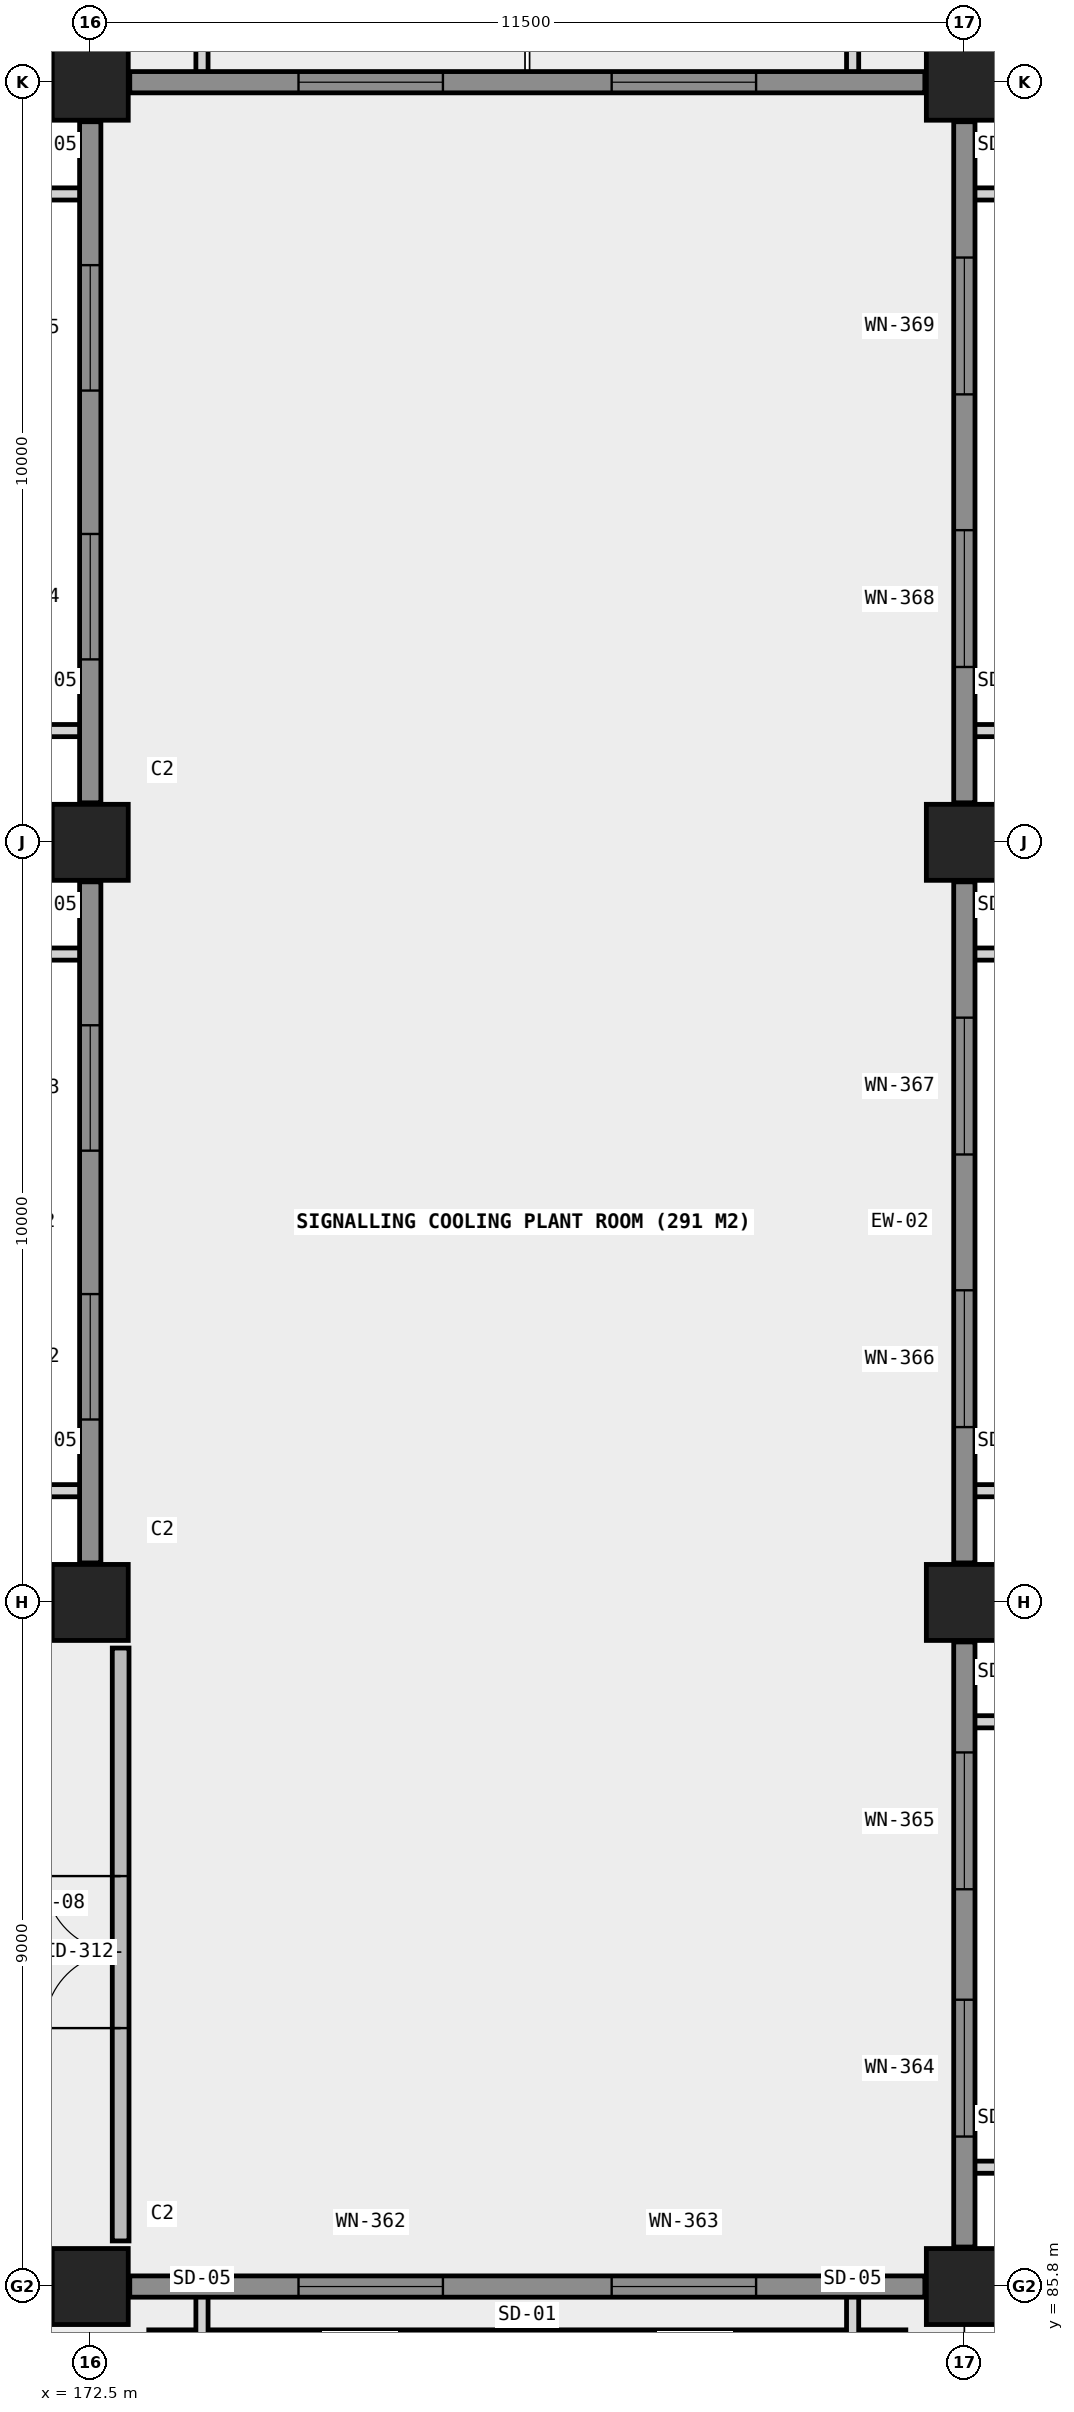
"""IFC4 building model, lengths in metres.
Left out: names, types, materials, properties, quantities, classifications, styles, units other than length and angle.
Written with IfcOpenShell. Run it as: python <this file> out.ifc"""

import sys

from ifc_helpers import new_model, si_unit, direction, frame, frame_2d, origin, origin_2d, place, context, subcontext, project, spatial, rectangle, extrude, element, fill, save


model = new_model("IFC4")
c1 = context("Model", 3, precision=1e-05, world=origin(), true_north=direction((0.0, 1.0)))
c2 = subcontext(c1, "Body", "Model", "MODEL_VIEW")
j1 = project(units=[si_unit("LENGTHUNIT", "METRE"), si_unit("PLANEANGLEUNIT", "RADIAN")], contexts=[c1])
p1 = place(None, origin())
s1 = spatial("IfcSite", under=j1, at=p1, CompositionType="ELEMENT")
p2 = place(p1, origin())
s2 = spatial("IfcBuilding", under=s1, at=p2, CompositionType="ELEMENT")
p3 = place(p2, frame((0.0, 0.0, 4.2)))
s3 = spatial("IfcBuildingStorey", under=s2, at=p3, CompositionType="ELEMENT", Elevation=4.2)
for number, where, z_axis, x_axis in (
    (1, (172.5, 85.8, 0.0), (0.0, 0.0, 1.0), (1.0, 0.0, 0.0)),
    (2, (172.5, 94.8, 0.0), (0.0, 0.0, 1.0), (1.0, 0.0, 0.0)),
    (3, (172.5, 104.8, 0.0), (0.0, 0.0, 1.0), (1.0, 0.0, 0.0)),
    (4, (172.5, 114.8, 0.0), (0.0, 0.0, 1.0), (1.0, 0.0, 0.0)),
    (5, (184.0, 85.8, 0.0), (0.0, 0.0, 1.0), (1.0, 0.0, 0.0)),
    (6, (184.0, 94.8, 0.0), (0.0, 0.0, 1.0), (1.0, 0.0, 0.0)),
    (7, (184.0, 104.8, 0.0), (0.0, 0.0, 1.0), (1.0, 0.0, 0.0)),
    (8, (184.0, 114.8, 0.0), (0.0, 0.0, 1.0), (1.0, 0.0, 0.0)),
):
    element("IfcColumn", number, at=place(p3, frame(where, z_axis=z_axis, x_axis=x_axis)), inside=s3, PredefinedType="COLUMN", context=c2, shape_type="SweptSolid", body=[
        extrude(rectangle(XDim=1.0, YDim=1.0, at=origin_2d()), origin(), (0.0, 0.0, 1.0), 4.2),
    ])
p4 = place(p3, frame((173.02, 85.8, 0.0), z_axis=(0.0, 0.0, 1.0), x_axis=(1.0, 0.0, 0.0)))
e9 = element("IfcWall", 9, at=p4, inside=s3, PredefinedType="SOLIDWALL", context=c2, shape_type="SweptSolid", body=[
    extrude(rectangle(XDim=10.46, YDim=0.28, at=frame_2d((5.23, 0.0))), origin(), (0.0, 0.0, 1.0), 3.15),
])
p5 = place(p4, frame((2.22, 0.0, 1.25)))
e10 = element("IfcOpeningElement", 10, at=p5, cuts=e9, PredefinedType="OPENING", context=c2, shape_type="SweptSolid", body=[
    extrude(rectangle(XDim=1.9, YDim=1.25, at=frame_2d((0.95, 0.625))), frame((0.0, 0.15, 0.0), z_axis=(0.0, -1.0, 0.0), x_axis=(1.0, 0.0, 0.0)), (0.0, 0.0, 1.0), 0.3),
])
p6 = place(p4, frame((6.34, 0.0, 1.25)))
e11 = element("IfcOpeningElement", 11, at=p6, cuts=e9, PredefinedType="OPENING", context=c2, shape_type="SweptSolid", body=[
    extrude(rectangle(XDim=1.9, YDim=1.25, at=frame_2d((0.95, 0.625))), frame((0.0, 0.15, 0.0), z_axis=(0.0, -1.0, 0.0), x_axis=(1.0, 0.0, 0.0)), (0.0, 0.0, 1.0), 0.3),
])
p7 = place(p3, frame((184.0, 86.32, 0.0), z_axis=(0.0, 0.0, 1.0), x_axis=(0.0, 1.0, 0.0)))
e12 = element("IfcWall", 12, at=p7, inside=s3, PredefinedType="SOLIDWALL", context=c2, shape_type="SweptSolid", body=[
    extrude(rectangle(XDim=7.96, YDim=0.28, at=frame_2d((3.98, 0.0))), origin(), (0.0, 0.0, 1.0), 3.25),
])
p8 = place(p7, frame((1.453, 0.0, 1.25)))
e13 = element("IfcOpeningElement", 13, at=p8, cuts=e12, PredefinedType="OPENING", context=c2, shape_type="SweptSolid", body=[
    extrude(rectangle(XDim=1.8, YDim=1.3, at=frame_2d((0.9, 0.65))), frame((0.0, 0.15, 0.0), z_axis=(0.0, -1.0, 0.0), x_axis=(1.0, 0.0, 0.0)), (0.0, 0.0, 1.0), 0.3),
])
p9 = place(p7, frame((4.707, 0.0, 1.25)))
e14 = element("IfcOpeningElement", 14, at=p9, cuts=e12, PredefinedType="OPENING", context=c2, shape_type="SweptSolid", body=[
    extrude(rectangle(XDim=1.8, YDim=1.3, at=frame_2d((0.9, 0.65))), frame((0.0, 0.15, 0.0), z_axis=(0.0, -1.0, 0.0), x_axis=(1.0, 0.0, 0.0)), (0.0, 0.0, 1.0), 0.3),
])
p10 = place(p3, frame((184.0, 95.32, 0.0), z_axis=(0.0, 0.0, 1.0), x_axis=(0.0, 1.0, 0.0)))
e15 = element("IfcWall", 15, at=p10, inside=s3, PredefinedType="SOLIDWALL", context=c2, shape_type="SweptSolid", body=[
    extrude(rectangle(XDim=8.96, YDim=0.28, at=frame_2d((4.48, 0.0))), origin(), (0.0, 0.0, 1.0), 3.25),
])
p11 = place(p10, frame((1.787, 0.0, 1.25)))
e16 = element("IfcOpeningElement", 16, at=p11, cuts=e15, PredefinedType="OPENING", context=c2, shape_type="SweptSolid", body=[
    extrude(rectangle(XDim=1.8, YDim=1.3, at=frame_2d((0.9, 0.65))), frame((0.0, 0.15, 0.0), z_axis=(0.0, -1.0, 0.0), x_axis=(1.0, 0.0, 0.0)), (0.0, 0.0, 1.0), 0.3),
])
p12 = place(p10, frame((5.373, 0.0, 1.25)))
e17 = element("IfcOpeningElement", 17, at=p12, cuts=e15, PredefinedType="OPENING", context=c2, shape_type="SweptSolid", body=[
    extrude(rectangle(XDim=1.8, YDim=1.3, at=frame_2d((0.9, 0.65))), frame((0.0, 0.15, 0.0), z_axis=(0.0, -1.0, 0.0), x_axis=(1.0, 0.0, 0.0)), (0.0, 0.0, 1.0), 0.3),
])
p13 = place(p3, frame((184.0, 105.32, 0.0), z_axis=(0.0, 0.0, 1.0), x_axis=(0.0, 1.0, 0.0)))
e18 = element("IfcWall", 18, at=p13, inside=s3, PredefinedType="SOLIDWALL", context=c2, shape_type="SweptSolid", body=[
    extrude(rectangle(XDim=8.96, YDim=0.28, at=frame_2d((4.48, 0.0))), origin(), (0.0, 0.0, 1.0), 3.25),
])
p14 = place(p13, frame((1.787, 0.0, 1.25)))
e19 = element("IfcOpeningElement", 19, at=p14, cuts=e18, PredefinedType="OPENING", context=c2, shape_type="SweptSolid", body=[
    extrude(rectangle(XDim=1.8, YDim=1.3, at=frame_2d((0.9, 0.65))), frame((0.0, 0.15, 0.0), z_axis=(0.0, -1.0, 0.0), x_axis=(1.0, 0.0, 0.0)), (0.0, 0.0, 1.0), 0.3),
])
p15 = place(p13, frame((5.373, 0.0, 1.25)))
e20 = element("IfcOpeningElement", 20, at=p15, cuts=e18, PredefinedType="OPENING", context=c2, shape_type="SweptSolid", body=[
    extrude(rectangle(XDim=1.8, YDim=1.3, at=frame_2d((0.9, 0.65))), frame((0.0, 0.15, 0.0), z_axis=(0.0, -1.0, 0.0), x_axis=(1.0, 0.0, 0.0)), (0.0, 0.0, 1.0), 0.3),
])
p16 = place(p3, frame((173.02, 114.8, 0.0), z_axis=(0.0, 0.0, 1.0), x_axis=(1.0, 0.0, 0.0)))
e21 = element("IfcWall", 21, at=p16, inside=s3, PredefinedType="SOLIDWALL", context=c2, shape_type="SweptSolid", body=[
    extrude(rectangle(XDim=10.46, YDim=0.28, at=frame_2d((5.23, 0.0))), origin(), (0.0, 0.0, 1.0), 3.15),
])
p17 = place(p16, frame((2.22, 0.0, 1.25)))
e22 = element("IfcOpeningElement", 22, at=p17, cuts=e21, PredefinedType="OPENING", context=c2, shape_type="SweptSolid", body=[
    extrude(rectangle(XDim=1.9, YDim=1.25, at=frame_2d((0.95, 0.625))), frame((0.0, 0.15, 0.0), z_axis=(0.0, -1.0, 0.0), x_axis=(1.0, 0.0, 0.0)), (0.0, 0.0, 1.0), 0.3),
])
p18 = place(p16, frame((6.34, 0.0, 1.25)))
e23 = element("IfcOpeningElement", 23, at=p18, cuts=e21, PredefinedType="OPENING", context=c2, shape_type="SweptSolid", body=[
    extrude(rectangle(XDim=1.9, YDim=1.25, at=frame_2d((0.95, 0.625))), frame((0.0, 0.15, 0.0), z_axis=(0.0, -1.0, 0.0), x_axis=(1.0, 0.0, 0.0)), (0.0, 0.0, 1.0), 0.3),
])
p19 = place(p3, frame((172.5, 95.32, 0.0), z_axis=(0.0, 0.0, 1.0), x_axis=(0.0, 1.0, 0.0)))
e24 = element("IfcWall", 24, at=p19, inside=s3, PredefinedType="SOLIDWALL", context=c2, shape_type="SweptSolid", body=[
    extrude(rectangle(XDim=8.96, YDim=0.28, at=frame_2d((4.48, 0.0))), origin(), (0.0, 0.0, 1.0), 3.15),
])
p20 = place(p19, frame((1.887, 0.0, 0.85)))
e25 = element("IfcOpeningElement", 25, at=p20, cuts=e24, PredefinedType="OPENING", context=c2, shape_type="SweptSolid", body=[
    extrude(rectangle(XDim=1.65, YDim=1.9, at=frame_2d((0.825, 0.95))), frame((0.0, 0.15, 0.0), z_axis=(0.0, -1.0, 0.0), x_axis=(1.0, 0.0, 0.0)), (0.0, 0.0, 1.0), 0.3),
])
p21 = place(p19, frame((5.423, 0.0, 0.85)))
e26 = element("IfcOpeningElement", 26, at=p21, cuts=e24, PredefinedType="OPENING", context=c2, shape_type="SweptSolid", body=[
    extrude(rectangle(XDim=1.65, YDim=1.9, at=frame_2d((0.825, 0.95))), frame((0.0, 0.15, 0.0), z_axis=(0.0, -1.0, 0.0), x_axis=(1.0, 0.0, 0.0)), (0.0, 0.0, 1.0), 0.3),
])
p22 = place(p3, frame((172.5, 105.32, 0.0), z_axis=(0.0, 0.0, 1.0), x_axis=(0.0, 1.0, 0.0)))
e27 = element("IfcWall", 27, at=p22, inside=s3, PredefinedType="SOLIDWALL", context=c2, shape_type="SweptSolid", body=[
    extrude(rectangle(XDim=8.96, YDim=0.28, at=frame_2d((4.48, 0.0))), origin(), (0.0, 0.0, 1.0), 3.15),
])
p23 = place(p22, frame((1.887, 0.0, 0.85)))
e28 = element("IfcOpeningElement", 28, at=p23, cuts=e27, PredefinedType="OPENING", context=c2, shape_type="SweptSolid", body=[
    extrude(rectangle(XDim=1.65, YDim=1.9, at=frame_2d((0.825, 0.95))), frame((0.0, 0.15, 0.0), z_axis=(0.0, -1.0, 0.0), x_axis=(1.0, 0.0, 0.0)), (0.0, 0.0, 1.0), 0.3),
])
p24 = place(p22, frame((5.423, 0.0, 0.85)))
e29 = element("IfcOpeningElement", 29, at=p24, cuts=e27, PredefinedType="OPENING", context=c2, shape_type="SweptSolid", body=[
    extrude(rectangle(XDim=1.65, YDim=1.9, at=frame_2d((0.825, 0.95))), frame((0.0, 0.15, 0.0), z_axis=(0.0, -1.0, 0.0), x_axis=(1.0, 0.0, 0.0)), (0.0, 0.0, 1.0), 0.3),
])
p25 = place(p3, frame((172.9, 86.4, 0.0), z_axis=(0.0, 0.0, 1.0), x_axis=(0.0, 1.0, 0.0)))
e30 = element("IfcWall", 30, at=p25, inside=s3, PredefinedType="SOLIDWALL", context=c2, shape_type="SweptSolid", body=[
    extrude(rectangle(XDim=7.8, YDim=0.22, at=frame_2d((3.9, 0.0))), origin(), (0.0, 0.0, 1.0), 3.84),
])
p26 = place(p25, frame((2.8, 0.0, 0.0)))
e31 = element("IfcOpeningElement", 31, at=p26, cuts=e30, PredefinedType="OPENING", context=c2, shape_type="SweptSolid", body=[
    extrude(rectangle(XDim=2.0, YDim=2.3, at=frame_2d((1.0, 1.15))), frame((0.0, 0.12, 0.0), z_axis=(0.0, -1.0, 0.0), x_axis=(1.0, 0.0, 0.0)), (0.0, 0.0, 1.0), 0.24),
])
p27 = place(p5, origin())
e32 = element("IfcWindow", 32, at=p27, inside=s3, PartitioningType="SINGLE_PANEL", PredefinedType="WINDOW", context=c2, shape_type="SweptSolid", body=[
    extrude(rectangle(XDim=1.9, YDim=1.25, at=frame_2d((0.95, 0.625))), frame((0.0, 0.03, 0.0), z_axis=(0.0, -1.0, 0.0), x_axis=(1.0, 0.0, 0.0)), (0.0, 0.0, 1.0), 0.06),
])
fill(e10, e32)
p28 = place(p6, origin())
e33 = element("IfcWindow", 33, at=p28, inside=s3, PartitioningType="SINGLE_PANEL", PredefinedType="WINDOW", context=c2, shape_type="SweptSolid", body=[
    extrude(rectangle(XDim=1.9, YDim=1.25, at=frame_2d((0.95, 0.625))), frame((0.0, 0.03, 0.0), z_axis=(0.0, -1.0, 0.0), x_axis=(1.0, 0.0, 0.0)), (0.0, 0.0, 1.0), 0.06),
])
fill(e11, e33)
p29 = place(p8, origin())
e34 = element("IfcWindow", 34, at=p29, inside=s3, PartitioningType="SINGLE_PANEL", PredefinedType="WINDOW", context=c2, shape_type="SweptSolid", body=[
    extrude(rectangle(XDim=1.8, YDim=1.3, at=frame_2d((0.9, 0.65))), frame((0.0, 0.03, 0.0), z_axis=(0.0, -1.0, 0.0), x_axis=(1.0, 0.0, 0.0)), (0.0, 0.0, 1.0), 0.06),
])
fill(e13, e34)
p30 = place(p9, origin())
e35 = element("IfcWindow", 35, at=p30, inside=s3, PartitioningType="SINGLE_PANEL", PredefinedType="WINDOW", context=c2, shape_type="SweptSolid", body=[
    extrude(rectangle(XDim=1.8, YDim=1.3, at=frame_2d((0.9, 0.65))), frame((0.0, 0.03, 0.0), z_axis=(0.0, -1.0, 0.0), x_axis=(1.0, 0.0, 0.0)), (0.0, 0.0, 1.0), 0.06),
])
fill(e14, e35)
p31 = place(p11, origin())
e36 = element("IfcWindow", 36, at=p31, inside=s3, PartitioningType="SINGLE_PANEL", PredefinedType="WINDOW", context=c2, shape_type="SweptSolid", body=[
    extrude(rectangle(XDim=1.8, YDim=1.3, at=frame_2d((0.9, 0.65))), frame((0.0, 0.03, 0.0), z_axis=(0.0, -1.0, 0.0), x_axis=(1.0, 0.0, 0.0)), (0.0, 0.0, 1.0), 0.06),
])
fill(e16, e36)
p32 = place(p12, origin())
e37 = element("IfcWindow", 37, at=p32, inside=s3, PartitioningType="SINGLE_PANEL", PredefinedType="WINDOW", context=c2, shape_type="SweptSolid", body=[
    extrude(rectangle(XDim=1.8, YDim=1.3, at=frame_2d((0.9, 0.65))), frame((0.0, 0.03, 0.0), z_axis=(0.0, -1.0, 0.0), x_axis=(1.0, 0.0, 0.0)), (0.0, 0.0, 1.0), 0.06),
])
fill(e17, e37)
p33 = place(p14, origin())
e38 = element("IfcWindow", 38, at=p33, inside=s3, PartitioningType="SINGLE_PANEL", PredefinedType="WINDOW", context=c2, shape_type="SweptSolid", body=[
    extrude(rectangle(XDim=1.8, YDim=1.3, at=frame_2d((0.9, 0.65))), frame((0.0, 0.03, 0.0), z_axis=(0.0, -1.0, 0.0), x_axis=(1.0, 0.0, 0.0)), (0.0, 0.0, 1.0), 0.06),
])
fill(e19, e38)
p34 = place(p15, origin())
e39 = element("IfcWindow", 39, at=p34, inside=s3, PartitioningType="SINGLE_PANEL", PredefinedType="WINDOW", context=c2, shape_type="SweptSolid", body=[
    extrude(rectangle(XDim=1.8, YDim=1.3, at=frame_2d((0.9, 0.65))), frame((0.0, 0.03, 0.0), z_axis=(0.0, -1.0, 0.0), x_axis=(1.0, 0.0, 0.0)), (0.0, 0.0, 1.0), 0.06),
])
fill(e20, e39)
p35 = place(p17, origin())
e40 = element("IfcWindow", 40, at=p35, inside=s3, PartitioningType="SINGLE_PANEL", PredefinedType="WINDOW", context=c2, shape_type="SweptSolid", body=[
    extrude(rectangle(XDim=1.9, YDim=1.25, at=frame_2d((0.95, 0.625))), frame((0.0, 0.03, 0.0), z_axis=(0.0, -1.0, 0.0), x_axis=(1.0, 0.0, 0.0)), (0.0, 0.0, 1.0), 0.06),
])
fill(e22, e40)
p36 = place(p18, origin())
e41 = element("IfcWindow", 41, at=p36, inside=s3, PartitioningType="SINGLE_PANEL", PredefinedType="WINDOW", context=c2, shape_type="SweptSolid", body=[
    extrude(rectangle(XDim=1.9, YDim=1.25, at=frame_2d((0.95, 0.625))), frame((0.0, 0.03, 0.0), z_axis=(0.0, -1.0, 0.0), x_axis=(1.0, 0.0, 0.0)), (0.0, 0.0, 1.0), 0.06),
])
fill(e23, e41)
p37 = place(p20, origin())
e42 = element("IfcWindow", 42, at=p37, inside=s3, PartitioningType="SINGLE_PANEL", PredefinedType="WINDOW", context=c2, shape_type="SweptSolid", body=[
    extrude(rectangle(XDim=1.65, YDim=1.9, at=frame_2d((0.825, 0.95))), frame((0.0, 0.03, 0.0), z_axis=(0.0, -1.0, 0.0), x_axis=(1.0, 0.0, 0.0)), (0.0, 0.0, 1.0), 0.06),
])
fill(e25, e42)
p38 = place(p21, origin())
e43 = element("IfcWindow", 43, at=p38, inside=s3, PartitioningType="SINGLE_PANEL", PredefinedType="WINDOW", context=c2, shape_type="SweptSolid", body=[
    extrude(rectangle(XDim=1.65, YDim=1.9, at=frame_2d((0.825, 0.95))), frame((0.0, 0.03, 0.0), z_axis=(0.0, -1.0, 0.0), x_axis=(1.0, 0.0, 0.0)), (0.0, 0.0, 1.0), 0.06),
])
fill(e26, e43)
p39 = place(p23, origin())
e44 = element("IfcWindow", 44, at=p39, inside=s3, PartitioningType="SINGLE_PANEL", PredefinedType="WINDOW", context=c2, shape_type="SweptSolid", body=[
    extrude(rectangle(XDim=1.65, YDim=1.9, at=frame_2d((0.825, 0.95))), frame((0.0, 0.03, 0.0), z_axis=(0.0, -1.0, 0.0), x_axis=(1.0, 0.0, 0.0)), (0.0, 0.0, 1.0), 0.06),
])
fill(e28, e44)
p40 = place(p24, origin())
e45 = element("IfcWindow", 45, at=p40, inside=s3, PartitioningType="SINGLE_PANEL", PredefinedType="WINDOW", context=c2, shape_type="SweptSolid", body=[
    extrude(rectangle(XDim=1.65, YDim=1.9, at=frame_2d((0.825, 0.95))), frame((0.0, 0.03, 0.0), z_axis=(0.0, -1.0, 0.0), x_axis=(1.0, 0.0, 0.0)), (0.0, 0.0, 1.0), 0.06),
])
fill(e29, e45)
p41 = place(p26, origin())
e46 = element("IfcDoor", 46, at=p41, inside=s3, OperationType="DOUBLE_DOOR_SINGLE_SWING", PredefinedType="DOOR", context=c2, shape_type="SweptSolid", body=[
    extrude(rectangle(XDim=2.0, YDim=2.3, at=frame_2d((1.0, 1.15))), frame((0.0, 0.025, 0.0), z_axis=(0.0, -1.0, 0.0), x_axis=(1.0, 0.0, 0.0)), (0.0, 0.0, 1.0), 0.05),
])
fill(e31, e46)
save(model, sys.argv[1])
